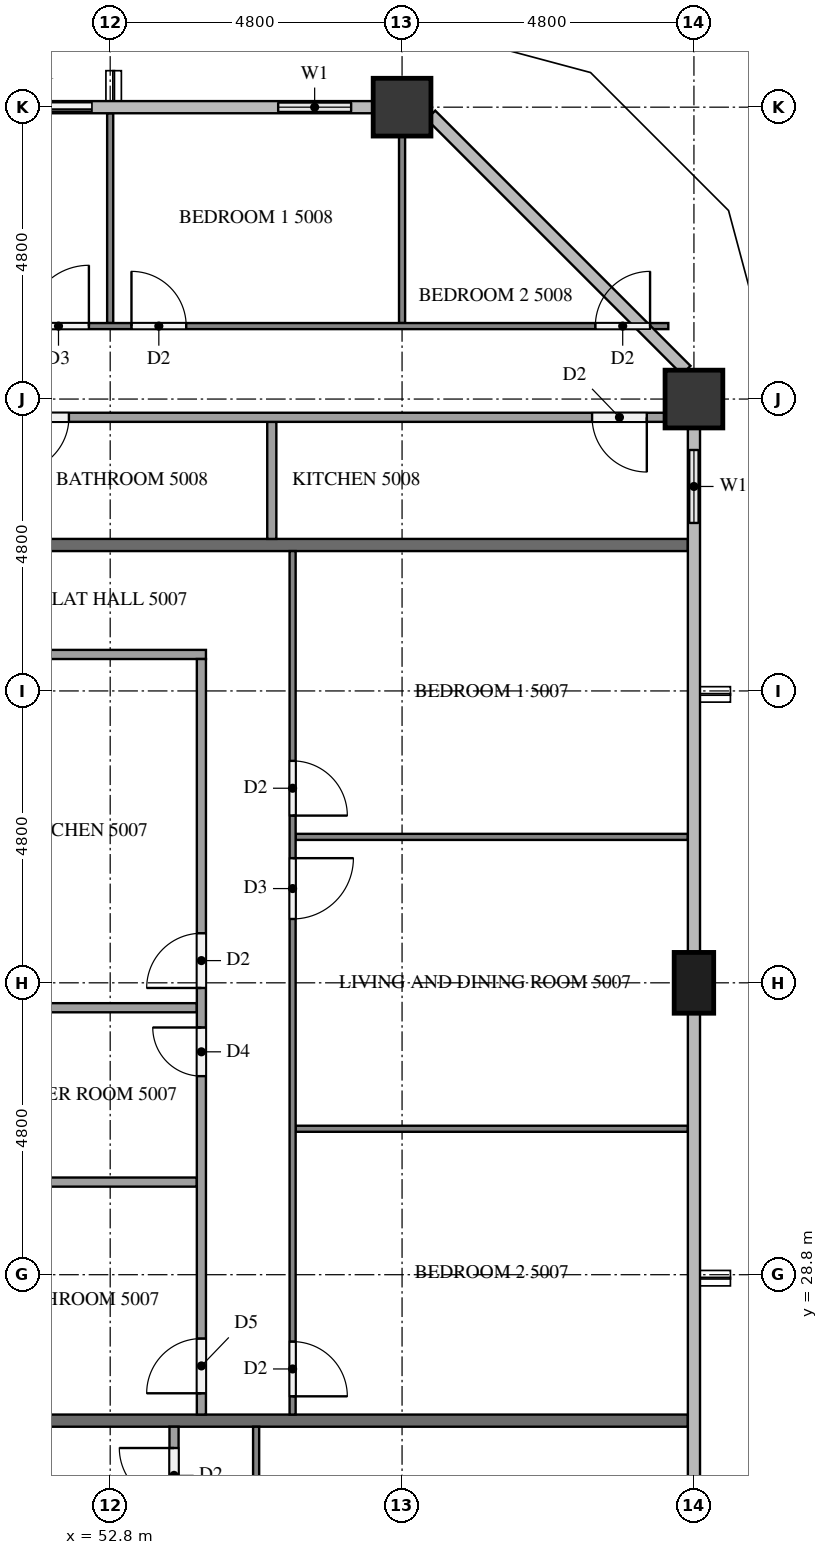
"""IFC4 building model, lengths in metres.
Left out: names, types, materials, properties, quantities, classifications, styles, units other than length and angle.
Written with IfcOpenShell. Run it as: python <this file> out.ifc"""

import sys

from ifc_helpers import new_model, si_unit, direction, frame, frame_2d, origin, origin_2d, place, context, subcontext, project, spatial, rectangle, extrude, element, fill, save


model = new_model("IFC4")
c1 = context("Model", 3, precision=1e-05, world=origin(), true_north=direction((0.0, 1.0)))
c2 = subcontext(c1, "Body", "Model", "MODEL_VIEW")
j1 = project(units=[si_unit("LENGTHUNIT", "METRE"), si_unit("PLANEANGLEUNIT", "RADIAN")], contexts=[c1])
p1 = place(None, origin())
s1 = spatial("IfcSite", under=j1, at=p1, CompositionType="ELEMENT")
p2 = place(p1, origin())
s2 = spatial("IfcBuilding", under=s1, at=p2, CompositionType="ELEMENT")
p3 = place(p2, frame((0.0, 0.0, 192.9)))
s3 = spatial("IfcBuildingStorey", under=s2, at=p3, CompositionType="ELEMENT", Elevation=192.9)
p4 = place(p3, frame((62.4, 33.6, 0.0), z_axis=(0.0, 0.0, 1.0), x_axis=(0.0, 1.0, 0.0)))
e1 = element("IfcColumn", 1, at=p4, inside=s3, PredefinedType="COLUMN", context=c2, shape_type="SweptSolid", body=[
    extrude(rectangle(XDim=1.0, YDim=0.65, at=origin_2d()), origin(), (0.0, 0.0, 1.0), 3.2),
])
for number, where, z_axis, x_axis in (
    (2, (62.4, 43.2, 0.0), (0.0, 0.0, 1.0), (1.0, 0.0, 0.0)),
    (3, (57.6, 48.0, 0.0), (0.0, 0.0, 1.0), (1.0, 0.0, 0.0)),
):
    element("IfcColumn", number, at=place(p3, frame(where, z_axis=z_axis, x_axis=x_axis)), inside=s3, PredefinedType="COLUMN", context=c2, shape_type="SweptSolid", body=[
        extrude(rectangle(XDim=0.95, YDim=0.95, at=origin_2d()), origin(), (0.0, 0.0, 1.0), 3.2),
    ])
p5 = place(p3, frame((62.4, 40.8, 0.0), z_axis=(0.0, 0.0, 1.0), x_axis=(0.0, 1.0, 0.0)))
e4 = element("IfcWall", 4, at=p5, inside=s3, PredefinedType="SOLIDWALL", context=c2, shape_type="SweptSolid", body=[
    extrude(rectangle(XDim=1.925, YDim=0.15, at=frame_2d((0.962, 0.0))), origin(), (0.0, 0.0, 1.0), 3.2),
])
p6 = place(p5, frame((0.363, 0.0, 0.9)))
e5 = element("IfcOpeningElement", 5, at=p6, cuts=e4, PredefinedType="OPENING", context=c2, shape_type="SweptSolid", body=[
    extrude(rectangle(XDim=1.2, YDim=1.4, at=frame_2d((0.6, 0.7))), frame((0.0, 0.085, 0.0), z_axis=(0.0, -1.0, 0.0), x_axis=(1.0, 0.0, 0.0)), (0.0, 0.0, 1.0), 0.17),
])
p7 = place(p3, frame((57.125, 48.0, 0.0), z_axis=(0.0, 0.0, 1.0), x_axis=(-1.0, 0.0, 0.0)))
e6 = element("IfcWall", 6, at=p7, inside=s3, PredefinedType="SOLIDWALL", context=c2, shape_type="SweptSolid", body=[
    extrude(rectangle(XDim=1.925, YDim=0.15, at=frame_2d((0.962, 0.0))), origin(), (0.0, 0.0, 1.0), 3.2),
])
p8 = place(p7, frame((0.363, 0.0, 0.9)))
e7 = element("IfcOpeningElement", 7, at=p8, cuts=e6, PredefinedType="OPENING", context=c2, shape_type="SweptSolid", body=[
    extrude(rectangle(XDim=1.2, YDim=1.4, at=frame_2d((0.6, 0.7))), frame((0.0, 0.085, 0.0), z_axis=(0.0, -1.0, 0.0), x_axis=(1.0, 0.0, 0.0)), (0.0, 0.0, 1.0), 0.17),
])
p9 = place(p3, frame((52.8, 48.0, 0.0), z_axis=(0.0, 0.0, 1.0), x_axis=(-1.0, 0.0, 0.0)))
e8 = element("IfcWall", 8, at=p9, inside=s3, PredefinedType="SOLIDWALL", context=c2, shape_type="SweptSolid", body=[
    extrude(rectangle(XDim=2.4, YDim=0.15, at=frame_2d((1.2, 0.0))), origin(), (0.0, 0.0, 1.0), 3.2),
])
p10 = place(p9, frame((0.3, 0.0, 0.0)))
e9 = element("IfcOpeningElement", 9, at=p10, cuts=e8, PredefinedType="OPENING", context=c2, shape_type="SweptSolid", body=[
    extrude(rectangle(XDim=1.8, YDim=2.4, at=frame_2d((0.9, 1.2))), frame((0.0, 0.085, 0.0), z_axis=(0.0, -1.0, 0.0), x_axis=(1.0, 0.0, 0.0)), (0.0, 0.0, 1.0), 0.17),
])
for number, where, z_axis, x_axis in (
    (10, (50.5, 26.4, 0.0), (0.0, 0.0, 1.0), (1.0, 0.0, 0.0)),
    (11, (50.5, 40.8, 0.0), (0.0, 0.0, 1.0), (1.0, 0.0, 0.0)),
):
    element("IfcWall", number, at=place(p3, frame(where, z_axis=z_axis, x_axis=x_axis)), inside=s3, PredefinedType="PARTITIONING", context=c2, shape_type="SweptSolid", body=[
        extrude(rectangle(XDim=11.8, YDim=0.2, at=frame_2d((5.9, 0.0))), origin(), (0.0, 0.0, 1.0), 3.2),
    ])
p11 = place(p3, frame((55.2, 26.3, 0.0), z_axis=(0.0, 0.0, 1.0), x_axis=(0.0, -1.0, 0.0)))
e12 = element("IfcWall", 12, at=p11, inside=s3, PredefinedType="PARTITIONING", context=c2, shape_type="SweptSolid", body=[
    extrude(rectangle(XDim=7.0, YDim=0.1, at=frame_2d((3.5, 0.0))), origin(), (0.0, 0.0, 1.0), 3.2),
])
p12 = place(p11, frame((5.7, 0.0, 0.0)))
e13 = element("IfcOpeningElement", 13, at=p12, cuts=e12, PredefinedType="OPENING", context=c2, shape_type="SweptSolid", body=[
    extrude(rectangle(XDim=1.0, YDim=2.1, at=frame_2d((0.5, 1.05))), frame((0.0, 0.06, 0.0), z_axis=(0.0, -1.0, 0.0), x_axis=(1.0, 0.0, 0.0)), (0.0, 0.0, 1.0), 0.12),
])
p13 = place(p3, frame((53.85, 21.075, 0.0), z_axis=(0.0, 0.0, 1.0), x_axis=(0.0, 1.0, 0.0)))
e14 = element("IfcWall", 14, at=p13, inside=s3, PredefinedType="PARTITIONING", context=c2, shape_type="SweptSolid", body=[
    extrude(rectangle(XDim=5.225, YDim=0.15, at=frame_2d((2.613, 0.0))), origin(), (0.0, 0.0, 1.0), 3.2),
])
p14 = place(p13, frame((0.3, 0.0, 0.0)))
e15 = element("IfcOpeningElement", 15, at=p14, cuts=e14, PredefinedType="OPENING", context=c2, shape_type="SweptSolid", body=[
    extrude(rectangle(XDim=0.8, YDim=2.1, at=frame_2d((0.4, 1.05))), frame((0.0, 0.085, 0.0), z_axis=(0.0, -1.0, 0.0), x_axis=(1.0, 0.0, 0.0)), (0.0, 0.0, 1.0), 0.17),
])
p15 = place(p13, frame((3.975, 0.0, 0.0)))
e16 = element("IfcOpeningElement", 16, at=p15, cuts=e14, PredefinedType="OPENING", context=c2, shape_type="SweptSolid", body=[
    extrude(rectangle(XDim=0.9, YDim=2.1, at=frame_2d((0.45, 1.05))), frame((0.0, 0.085, 0.0), z_axis=(0.0, -1.0, 0.0), x_axis=(1.0, 0.0, 0.0)), (0.0, 0.0, 1.0), 0.17),
])
for number, where, z_axis, x_axis in (
    (17, (55.85, 36.0, 0.0), (0.0, 0.0, 1.0), (1.0, 0.0, 0.0)),
    (18, (55.85, 31.2, 0.0), (0.0, 0.0, 1.0), (1.0, 0.0, 0.0)),
):
    element("IfcWall", number, at=place(p3, frame(where, z_axis=z_axis, x_axis=x_axis)), inside=s3, PredefinedType="PARTITIONING", context=c2, shape_type="SweptSolid", body=[
        extrude(rectangle(XDim=6.45, YDim=0.1, at=frame_2d((3.225, 0.0))), origin(), (0.0, 0.0, 1.0), 3.2),
    ])
p16 = place(p3, frame((55.8, 40.7, 0.0), z_axis=(0.0, 0.0, 1.0), x_axis=(0.0, -1.0, 0.0)))
e19 = element("IfcWall", 19, at=p16, inside=s3, PredefinedType="PARTITIONING", context=c2, shape_type="SweptSolid", body=[
    extrude(rectangle(XDim=14.2, YDim=0.1, at=frame_2d((7.1, 0.0))), origin(), (0.0, 0.0, 1.0), 3.2),
])
p17 = place(p16, frame((3.45, 0.0, 0.0)))
e20 = element("IfcOpeningElement", 20, at=p17, cuts=e19, PredefinedType="OPENING", context=c2, shape_type="SweptSolid", body=[
    extrude(rectangle(XDim=0.9, YDim=2.1, at=frame_2d((0.45, 1.05))), frame((0.0, 0.06, 0.0), z_axis=(0.0, -1.0, 0.0), x_axis=(1.0, 0.0, 0.0)), (0.0, 0.0, 1.0), 0.12),
])
p18 = place(p16, frame((5.05, 0.0, 0.0)))
e21 = element("IfcOpeningElement", 21, at=p18, cuts=e19, PredefinedType="OPENING", context=c2, shape_type="SweptSolid", body=[
    extrude(rectangle(XDim=1.0, YDim=2.1, at=frame_2d((0.5, 1.05))), frame((0.0, 0.06, 0.0), z_axis=(0.0, -1.0, 0.0), x_axis=(1.0, 0.0, 0.0)), (0.0, 0.0, 1.0), 0.12),
])
p19 = place(p16, frame((13.0, 0.0, 0.0)))
e22 = element("IfcOpeningElement", 22, at=p19, cuts=e19, PredefinedType="OPENING", context=c2, shape_type="SweptSolid", body=[
    extrude(rectangle(XDim=0.9, YDim=2.1, at=frame_2d((0.45, 1.05))), frame((0.0, 0.06, 0.0), z_axis=(0.0, -1.0, 0.0), x_axis=(1.0, 0.0, 0.0)), (0.0, 0.0, 1.0), 0.12),
])
for number, where, z_axis, x_axis in (
    (23, (50.5, 33.19, 0.0), (0.0, 0.0, 1.0), (1.0, 0.0, 0.0)),
    (24, (50.5, 30.323, 0.0), (0.0, 0.0, 1.0), (1.0, 0.0, 0.0)),
):
    element("IfcWall", number, at=place(p3, frame(where, z_axis=z_axis, x_axis=x_axis)), inside=s3, PredefinedType="PARTITIONING", context=c2, shape_type="SweptSolid", body=[
        extrude(rectangle(XDim=3.725, YDim=0.15, at=frame_2d((1.863, 0.0))), origin(), (0.0, 0.0, 1.0), 3.2),
    ])
p20 = place(p3, frame((50.5, 39.0, 0.0), z_axis=(0.0, 0.0, 1.0), x_axis=(1.0, 0.0, 0.0)))
e25 = element("IfcWall", 25, at=p20, inside=s3, PredefinedType="PARTITIONING", context=c2, shape_type="SweptSolid", body=[
    extrude(rectangle(XDim=3.875, YDim=0.15, at=frame_2d((1.938, 0.0))), origin(), (0.0, 0.0, 1.0), 3.2),
])
p21 = place(p3, frame((54.3, 26.5, 0.0), z_axis=(0.0, 0.0, 1.0), x_axis=(0.0, 1.0, 0.0)))
e26 = element("IfcWall", 26, at=p21, inside=s3, PredefinedType="PARTITIONING", context=c2, shape_type="SweptSolid", body=[
    extrude(rectangle(XDim=12.425, YDim=0.15, at=frame_2d((6.212, 0.0))), origin(), (0.0, 0.0, 1.0), 3.2),
])
p22 = place(p21, frame((7.015, 0.0, 0.0)))
e27 = element("IfcOpeningElement", 27, at=p22, cuts=e26, PredefinedType="OPENING", context=c2, shape_type="SweptSolid", body=[
    extrude(rectangle(XDim=0.9, YDim=2.1, at=frame_2d((0.45, 1.05))), frame((0.0, 0.085, 0.0), z_axis=(0.0, -1.0, 0.0), x_axis=(1.0, 0.0, 0.0)), (0.0, 0.0, 1.0), 0.17),
])
p23 = place(p21, frame((5.565, 0.0, 0.0)))
e28 = element("IfcOpeningElement", 28, at=p23, cuts=e26, PredefinedType="OPENING", context=c2, shape_type="SweptSolid", body=[
    extrude(rectangle(XDim=0.8, YDim=2.1, at=frame_2d((0.4, 1.05))), frame((0.0, 0.085, 0.0), z_axis=(0.0, -1.0, 0.0), x_axis=(1.0, 0.0, 0.0)), (0.0, 0.0, 1.0), 0.17),
])
p24 = place(p21, frame((0.35, 0.0, 0.0)))
e29 = element("IfcOpeningElement", 29, at=p24, cuts=e26, PredefinedType="OPENING", context=c2, shape_type="SweptSolid", body=[
    extrude(rectangle(XDim=0.9, YDim=2.1, at=frame_2d((0.45, 1.05))), frame((0.0, 0.085, 0.0), z_axis=(0.0, -1.0, 0.0), x_axis=(1.0, 0.0, 0.0)), (0.0, 0.0, 1.0), 0.17),
])
p25 = place(p3, frame((52.8, 44.45, 0.0), z_axis=(0.0, 0.0, 1.0), x_axis=(0.0, 1.0, 0.0)))
e30 = element("IfcWall", 30, at=p25, inside=s3, PredefinedType="PARTITIONING", context=c2, shape_type="SweptSolid", body=[
    extrude(rectangle(XDim=3.45, YDim=0.1, at=frame_2d((1.725, 0.0))), origin(), (0.0, 0.0, 1.0), 3.2),
])
p26 = place(p3, frame((57.6, 44.45, 0.0), z_axis=(0.0, 0.0, 1.0), x_axis=(0.0, 1.0, 0.0)))
e31 = element("IfcWall", 31, at=p26, inside=s3, PredefinedType="PARTITIONING", context=c2, shape_type="SweptSolid", body=[
    extrude(rectangle(XDim=3.075, YDim=0.1, at=frame_2d((1.538, 0.0))), origin(), (0.0, 0.0, 1.0), 3.2),
])
p27 = place(p3, frame((45.7, 44.4, 0.0), z_axis=(0.0, 0.0, 1.0), x_axis=(1.0, 0.0, 0.0)))
e32 = element("IfcWall", 32, at=p27, inside=s3, PredefinedType="PARTITIONING", context=c2, shape_type="SweptSolid", body=[
    extrude(rectangle(XDim=16.279, YDim=0.1, at=frame_2d((8.139, 0.0))), origin(), (0.0, 0.0, 1.0), 3.2),
])
p28 = place(p27, frame((5.75, 0.0, 0.0)))
e33 = element("IfcOpeningElement", 33, at=p28, cuts=e32, PredefinedType="OPENING", context=c2, shape_type="SweptSolid", body=[
    extrude(rectangle(XDim=1.0, YDim=2.1, at=frame_2d((0.5, 1.05))), frame((0.0, 0.06, 0.0), z_axis=(0.0, -1.0, 0.0), x_axis=(1.0, 0.0, 0.0)), (0.0, 0.0, 1.0), 0.12),
])
p29 = place(p27, frame((7.45, 0.0, 0.0)))
e34 = element("IfcOpeningElement", 34, at=p29, cuts=e32, PredefinedType="OPENING", context=c2, shape_type="SweptSolid", body=[
    extrude(rectangle(XDim=0.9, YDim=2.1, at=frame_2d((0.45, 1.05))), frame((0.0, 0.06, 0.0), z_axis=(0.0, -1.0, 0.0), x_axis=(1.0, 0.0, 0.0)), (0.0, 0.0, 1.0), 0.12),
])
p30 = place(p27, frame((15.079, 0.0, 0.0)))
e35 = element("IfcOpeningElement", 35, at=p30, cuts=e32, PredefinedType="OPENING", context=c2, shape_type="SweptSolid", body=[
    extrude(rectangle(XDim=0.9, YDim=2.1, at=frame_2d((0.45, 1.05))), frame((0.0, 0.06, 0.0), z_axis=(0.0, -1.0, 0.0), x_axis=(1.0, 0.0, 0.0)), (0.0, 0.0, 1.0), 0.12),
])
p31 = place(p3, frame((55.458, 40.9, 0.0), z_axis=(0.0, 0.0, 1.0), x_axis=(0.0, 1.0, 0.0)))
e36 = element("IfcWall", 36, at=p31, inside=s3, PredefinedType="PARTITIONING", context=c2, shape_type="SweptSolid", body=[
    extrude(rectangle(XDim=1.925, YDim=0.15, at=frame_2d((0.962, 0.0))), origin(), (0.0, 0.0, 1.0), 3.2),
])
p32 = place(p3, frame((61.925, 42.9, 0.0), z_axis=(0.0, 0.0, 1.0), x_axis=(-1.0, 0.0, 0.0)))
e37 = element("IfcWall", 37, at=p32, inside=s3, PredefinedType="PARTITIONING", context=c2, shape_type="SweptSolid", body=[
    extrude(rectangle(XDim=14.45, YDim=0.15, at=frame_2d((7.225, 0.0))), origin(), (0.0, 0.0, 1.0), 3.2),
])
p33 = place(p32, frame((11.354, 0.0, 0.0)))
e38 = element("IfcOpeningElement", 38, at=p33, cuts=e37, PredefinedType="OPENING", context=c2, shape_type="SweptSolid", body=[
    extrude(rectangle(XDim=0.8, YDim=2.1, at=frame_2d((0.4, 1.05))), frame((0.0, 0.085, 0.0), z_axis=(0.0, -1.0, 0.0), x_axis=(1.0, 0.0, 0.0)), (0.0, 0.0, 1.0), 0.17),
])
p34 = place(p32, frame((9.804, 0.0, 0.0)))
e39 = element("IfcOpeningElement", 39, at=p34, cuts=e37, PredefinedType="OPENING", context=c2, shape_type="SweptSolid", body=[
    extrude(rectangle(XDim=0.9, YDim=2.1, at=frame_2d((0.45, 1.05))), frame((0.0, 0.085, 0.0), z_axis=(0.0, -1.0, 0.0), x_axis=(1.0, 0.0, 0.0)), (0.0, 0.0, 1.0), 0.17),
])
p35 = place(p32, frame((0.3, 0.0, 0.0)))
e40 = element("IfcOpeningElement", 40, at=p35, cuts=e37, PredefinedType="OPENING", context=c2, shape_type="SweptSolid", body=[
    extrude(rectangle(XDim=0.9, YDim=2.1, at=frame_2d((0.45, 1.05))), frame((0.0, 0.085, 0.0), z_axis=(0.0, -1.0, 0.0), x_axis=(1.0, 0.0, 0.0)), (0.0, 0.0, 1.0), 0.17),
])
p36 = place(p6, origin())
e41 = element("IfcWindow", 41, at=p36, inside=s3, PartitioningType="SINGLE_PANEL", PredefinedType="WINDOW", context=c2, shape_type="SweptSolid", body=[
    extrude(rectangle(XDim=1.2, YDim=1.4, at=frame_2d((0.6, 0.7))), frame((0.0, 0.03, 0.0), z_axis=(0.0, -1.0, 0.0), x_axis=(1.0, 0.0, 0.0)), (0.0, 0.0, 1.0), 0.06),
])
fill(e5, e41)
p37 = place(p8, origin())
e42 = element("IfcWindow", 42, at=p37, inside=s3, PartitioningType="SINGLE_PANEL", PredefinedType="WINDOW", context=c2, shape_type="SweptSolid", body=[
    extrude(rectangle(XDim=1.2, YDim=1.4, at=frame_2d((0.6, 0.7))), frame((0.0, 0.03, 0.0), z_axis=(0.0, -1.0, 0.0), x_axis=(1.0, 0.0, 0.0)), (0.0, 0.0, 1.0), 0.06),
])
fill(e7, e42)
p38 = place(p10, origin())
e43 = element("IfcDoor", 43, at=p38, inside=s3, OperationType="SLIDING_TO_LEFT", PredefinedType="DOOR", context=c2, shape_type="SweptSolid", body=[
    extrude(rectangle(XDim=1.8, YDim=2.4, at=frame_2d((0.9, 1.2))), frame((0.0, 0.025, 0.0), z_axis=(0.0, -1.0, 0.0), x_axis=(1.0, 0.0, 0.0)), (0.0, 0.0, 1.0), 0.05),
])
fill(e9, e43)
p39 = place(p15, origin())
e44 = element("IfcDoor", 44, at=p39, inside=s3, OperationType="SINGLE_SWING_RIGHT", PredefinedType="DOOR", context=c2, shape_type="SweptSolid", body=[
    extrude(rectangle(XDim=0.9, YDim=2.1, at=frame_2d((0.45, 1.05))), frame((0.0, 0.025, 0.0), z_axis=(0.0, -1.0, 0.0), x_axis=(1.0, 0.0, 0.0)), (0.0, 0.0, 1.0), 0.05),
])
fill(e16, e44)
p40 = place(p17, origin())
e45 = element("IfcDoor", 45, at=p40, inside=s3, OperationType="SINGLE_SWING_RIGHT", PredefinedType="DOOR", context=c2, shape_type="SweptSolid", body=[
    extrude(rectangle(XDim=0.9, YDim=2.1, at=frame_2d((0.45, 1.05))), frame((0.0, 0.025, 0.0), z_axis=(0.0, -1.0, 0.0), x_axis=(1.0, 0.0, 0.0)), (0.0, 0.0, 1.0), 0.05),
])
fill(e20, e45)
p41 = place(p18, origin())
e46 = element("IfcDoor", 46, at=p41, inside=s3, OperationType="SINGLE_SWING_LEFT", PredefinedType="DOOR", context=c2, shape_type="SweptSolid", body=[
    extrude(rectangle(XDim=1.0, YDim=2.1, at=frame_2d((0.5, 1.05))), frame((0.0, 0.025, 0.0), z_axis=(0.0, -1.0, 0.0), x_axis=(1.0, 0.0, 0.0)), (0.0, 0.0, 1.0), 0.05),
])
fill(e21, e46)
p42 = place(p19, origin())
e47 = element("IfcDoor", 47, at=p42, inside=s3, OperationType="SINGLE_SWING_RIGHT", PredefinedType="DOOR", context=c2, shape_type="SweptSolid", body=[
    extrude(rectangle(XDim=0.9, YDim=2.1, at=frame_2d((0.45, 1.05))), frame((0.0, 0.025, 0.0), z_axis=(0.0, -1.0, 0.0), x_axis=(1.0, 0.0, 0.0)), (0.0, 0.0, 1.0), 0.05),
])
fill(e22, e47)
p43 = place(p22, origin())
e48 = element("IfcDoor", 48, at=p43, inside=s3, OperationType="SINGLE_SWING_LEFT", PredefinedType="DOOR", context=c2, shape_type="SweptSolid", body=[
    extrude(rectangle(XDim=0.9, YDim=2.1, at=frame_2d((0.45, 1.05))), frame((0.0, 0.025, 0.0), z_axis=(0.0, -1.0, 0.0), x_axis=(1.0, 0.0, 0.0)), (0.0, 0.0, 1.0), 0.05),
])
fill(e27, e48)
p44 = place(p23, origin())
e49 = element("IfcDoor", 49, at=p44, inside=s3, OperationType="SINGLE_SWING_RIGHT", PredefinedType="DOOR", context=c2, shape_type="SweptSolid", body=[
    extrude(rectangle(XDim=0.8, YDim=2.1, at=frame_2d((0.4, 1.05))), frame((0.0, 0.025, 0.0), z_axis=(0.0, -1.0, 0.0), x_axis=(1.0, 0.0, 0.0)), (0.0, 0.0, 1.0), 0.05),
])
fill(e28, e49)
p45 = place(p24, origin())
e50 = element("IfcDoor", 50, at=p45, inside=s3, OperationType="SINGLE_SWING_LEFT", PredefinedType="DOOR", context=c2, shape_type="SweptSolid", body=[
    extrude(rectangle(XDim=0.9, YDim=2.1, at=frame_2d((0.45, 1.05))), frame((0.0, 0.025, 0.0), z_axis=(0.0, -1.0, 0.0), x_axis=(1.0, 0.0, 0.0)), (0.0, 0.0, 1.0), 0.05),
])
fill(e29, e50)
p46 = place(p28, origin())
e51 = element("IfcDoor", 51, at=p46, inside=s3, OperationType="SINGLE_SWING_RIGHT", PredefinedType="DOOR", context=c2, shape_type="SweptSolid", body=[
    extrude(rectangle(XDim=1.0, YDim=2.1, at=frame_2d((0.5, 1.05))), frame((0.0, 0.025, 0.0), z_axis=(0.0, -1.0, 0.0), x_axis=(1.0, 0.0, 0.0)), (0.0, 0.0, 1.0), 0.05),
])
fill(e33, e51)
p47 = place(p29, origin())
e52 = element("IfcDoor", 52, at=p47, inside=s3, OperationType="SINGLE_SWING_LEFT", PredefinedType="DOOR", context=c2, shape_type="SweptSolid", body=[
    extrude(rectangle(XDim=0.9, YDim=2.1, at=frame_2d((0.45, 1.05))), frame((0.0, 0.025, 0.0), z_axis=(0.0, -1.0, 0.0), x_axis=(1.0, 0.0, 0.0)), (0.0, 0.0, 1.0), 0.05),
])
fill(e34, e52)
p48 = place(p30, origin())
e53 = element("IfcDoor", 53, at=p48, inside=s3, OperationType="SINGLE_SWING_RIGHT", PredefinedType="DOOR", context=c2, shape_type="SweptSolid", body=[
    extrude(rectangle(XDim=0.9, YDim=2.1, at=frame_2d((0.45, 1.05))), frame((0.0, 0.025, 0.0), z_axis=(0.0, -1.0, 0.0), x_axis=(1.0, 0.0, 0.0)), (0.0, 0.0, 1.0), 0.05),
])
fill(e35, e53)
p49 = place(p34, origin())
e54 = element("IfcDoor", 54, at=p49, inside=s3, OperationType="SINGLE_SWING_RIGHT", PredefinedType="DOOR", context=c2, shape_type="SweptSolid", body=[
    extrude(rectangle(XDim=0.9, YDim=2.1, at=frame_2d((0.45, 1.05))), frame((0.0, 0.025, 0.0), z_axis=(0.0, -1.0, 0.0), x_axis=(1.0, 0.0, 0.0)), (0.0, 0.0, 1.0), 0.05),
])
fill(e39, e54)
p50 = place(p35, origin())
e55 = element("IfcDoor", 55, at=p50, inside=s3, OperationType="SINGLE_SWING_LEFT", PredefinedType="DOOR", context=c2, shape_type="SweptSolid", body=[
    extrude(rectangle(XDim=0.9, YDim=2.1, at=frame_2d((0.45, 1.05))), frame((0.0, 0.025, 0.0), z_axis=(0.0, -1.0, 0.0), x_axis=(1.0, 0.0, 0.0)), (0.0, 0.0, 1.0), 0.05),
])
fill(e40, e55)
save(model, sys.argv[1])
